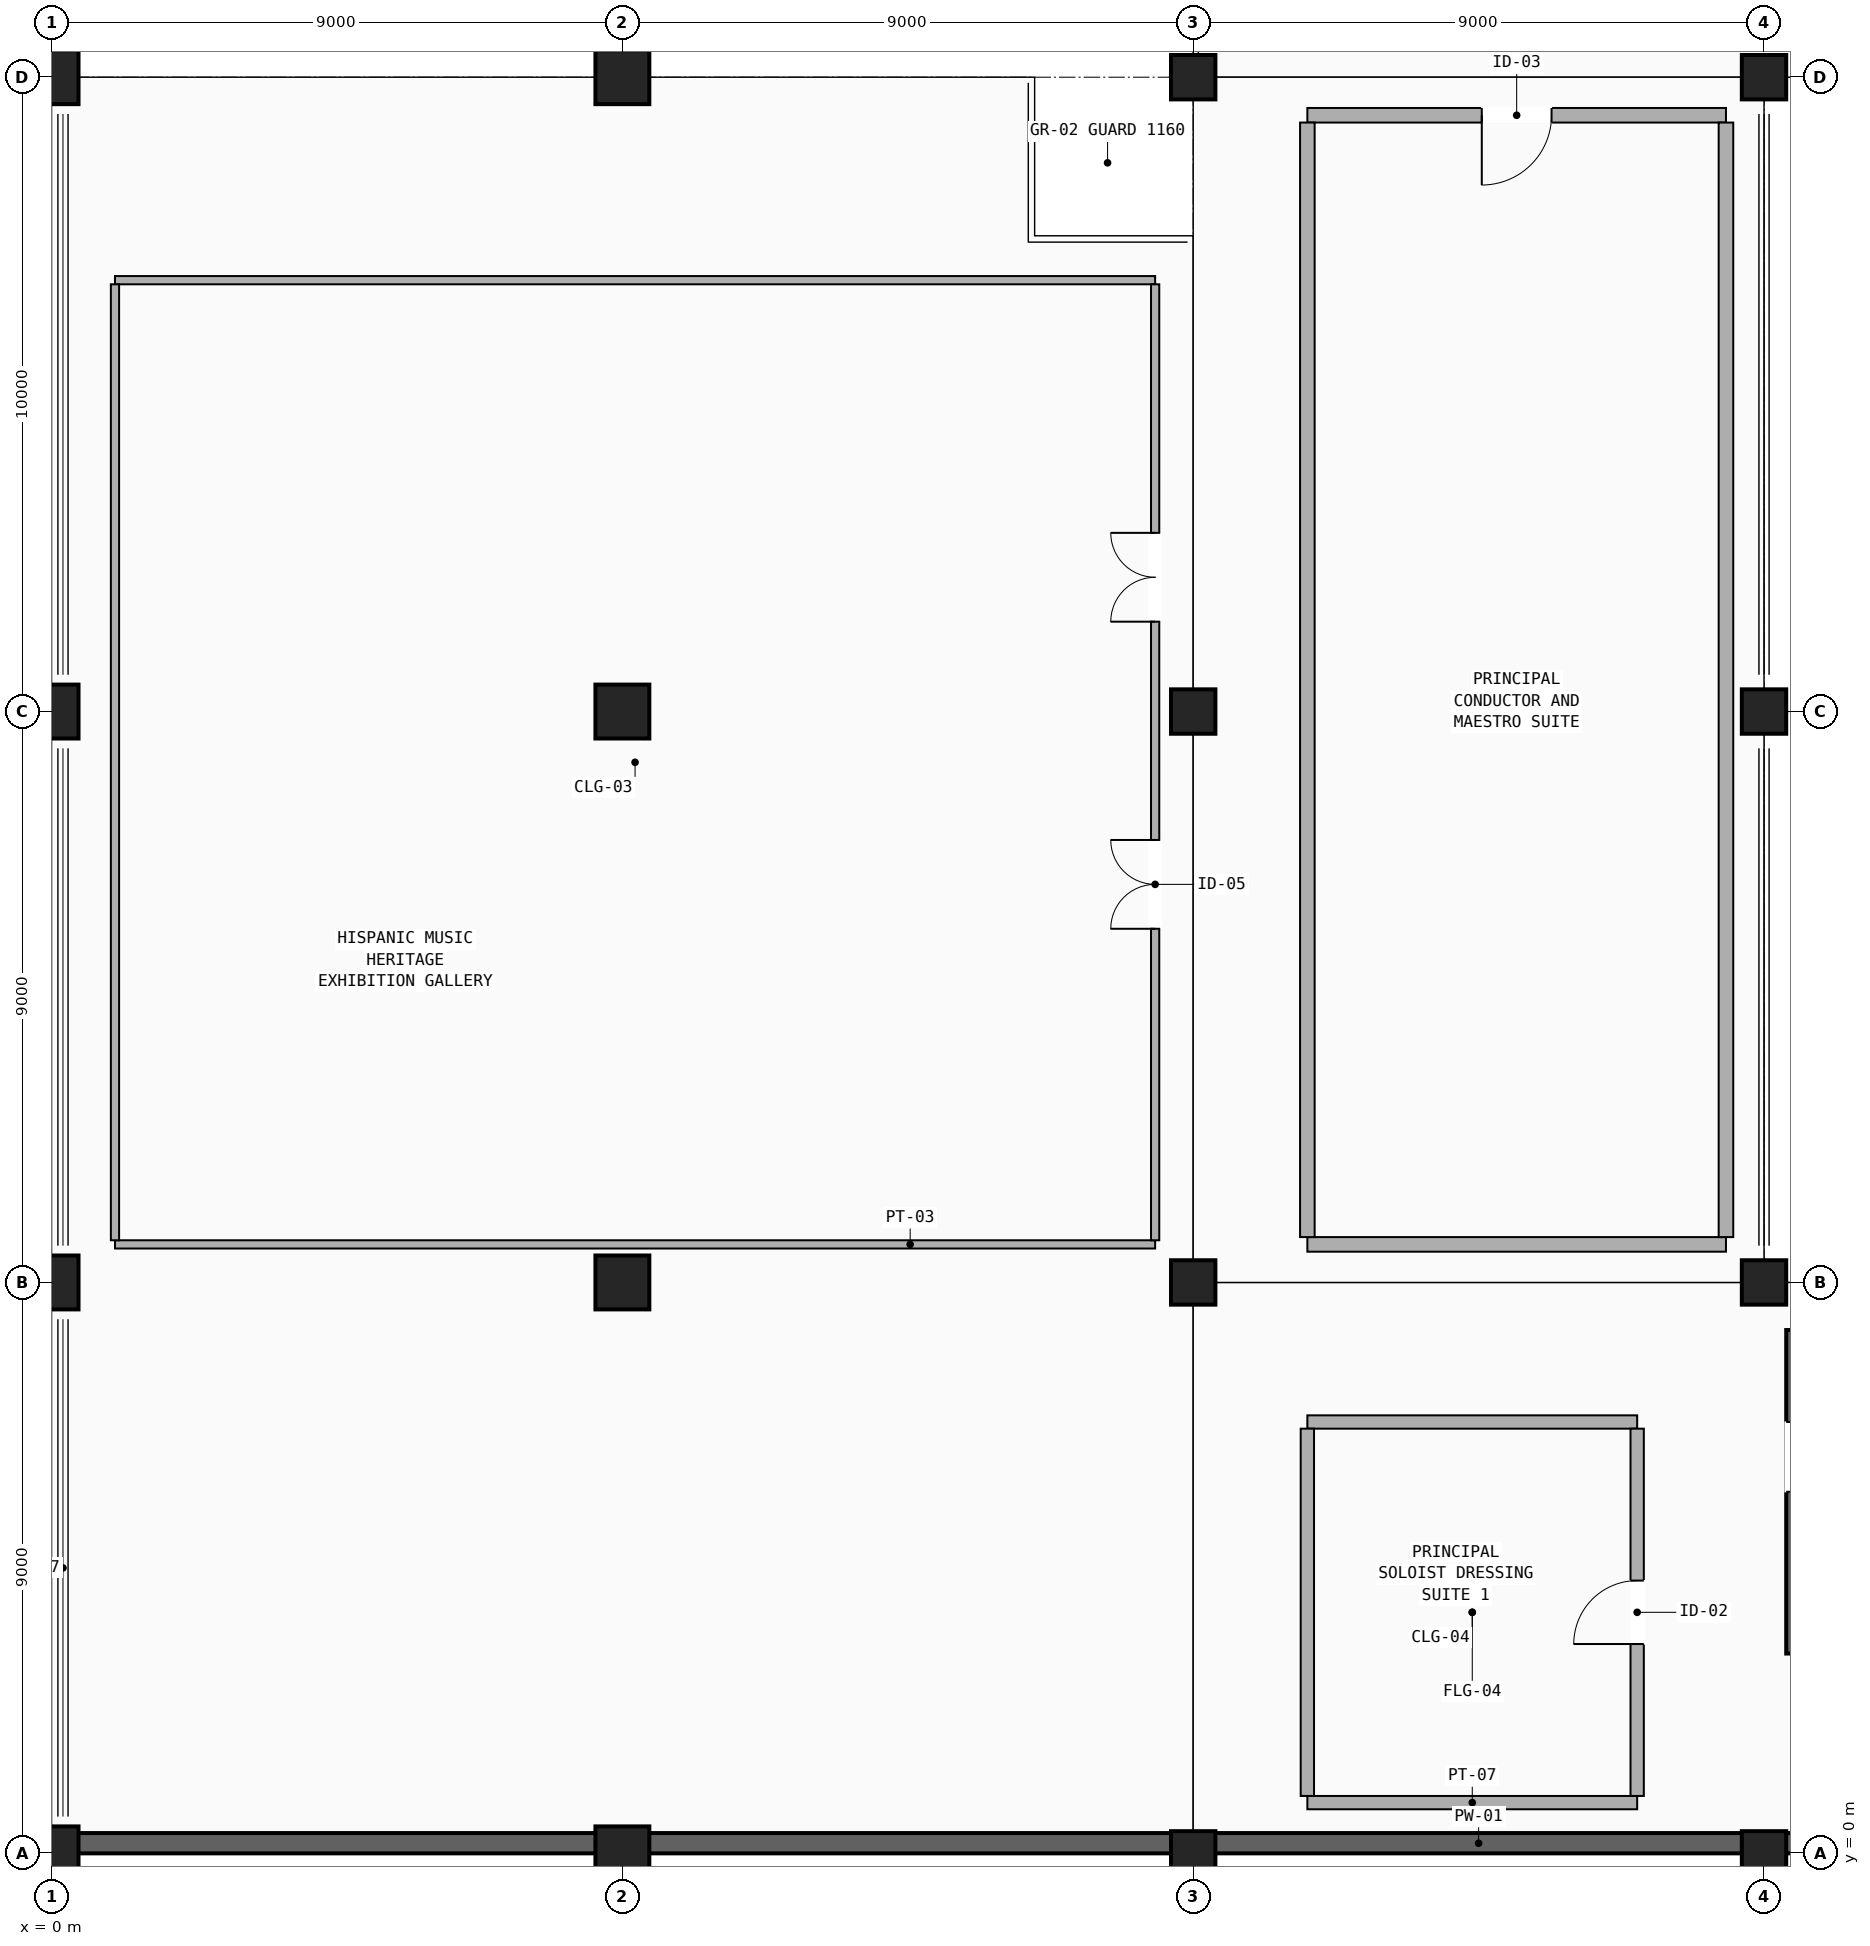
"""IFC4 building model, lengths in metres.
Left out: names, types, materials, properties, quantities, classifications, styles, units other than length and angle.
Written with IfcOpenShell. Run it as: python <this file> out.ifc"""

import sys

from ifc_helpers import new_model, si_unit, direction, frame, frame_2d, origin, origin_2d, place, context, subcontext, project, spatial, rectangle, circle, extrude, element, fill, save


model = new_model("IFC4")
c1 = context("Model", 3, precision=1e-05, world=origin(), true_north=direction((0.0, 1.0)))
c2 = subcontext(c1, "Body", "Model", "MODEL_VIEW")
j1 = project(units=[si_unit("LENGTHUNIT", "METRE"), si_unit("PLANEANGLEUNIT", "RADIAN")], contexts=[c1])
p1 = place(None, origin())
s1 = spatial("IfcSite", under=j1, at=p1, CompositionType="ELEMENT")
p2 = place(p1, origin())
s2 = spatial("IfcBuilding", under=s1, at=p2, CompositionType="ELEMENT")
p3 = place(p2, frame((0.0, 0.0, 5.1)))
s3 = spatial("IfcBuildingStorey", under=s2, at=p3, CompositionType="ELEMENT", Elevation=5.1)
for number, where, z_axis, x_axis in (
    (1, (0.0, 0.0, 0.0), (0.0, 0.0, 1.0), (1.0, 0.0, 0.0)),
    (2, (0.0, 9.0, 0.0), (0.0, 0.0, 1.0), (1.0, 0.0, 0.0)),
    (3, (0.0, 18.0, 0.0), (0.0, 0.0, 1.0), (1.0, 0.0, 0.0)),
    (4, (0.0, 28.0, 0.0), (0.0, 0.0, 1.0), (1.0, 0.0, 0.0)),
    (5, (9.0, 0.0, 0.0), (0.0, 0.0, 1.0), (1.0, 0.0, 0.0)),
    (6, (9.0, 9.0, 0.0), (0.0, 0.0, 1.0), (1.0, 0.0, 0.0)),
    (7, (9.0, 18.0, 0.0), (0.0, 0.0, 1.0), (1.0, 0.0, 0.0)),
    (8, (9.0, 28.0, 0.0), (0.0, 0.0, 1.0), (1.0, 0.0, 0.0)),
):
    element("IfcColumn", number, at=place(p3, frame(where, z_axis=z_axis, x_axis=x_axis)), inside=s3, PredefinedType="COLUMN", context=c2, shape_type="SweptSolid", body=[
        extrude(circle(Radius=0.425, at=origin_2d()), origin(), (0.0, 0.0, 1.0), 4.42),
    ])
for number, where, z_axis, x_axis in (
    (9, (18.0, 0.0, 0.0), (0.0, 0.0, 1.0), (1.0, 0.0, 0.0)),
    (10, (18.0, 9.0, 0.0), (0.0, 0.0, 1.0), (1.0, 0.0, 0.0)),
    (11, (18.0, 18.0, 0.0), (0.0, 0.0, 1.0), (1.0, 0.0, 0.0)),
    (12, (18.0, 28.0, 0.0), (0.0, 0.0, 1.0), (1.0, 0.0, 0.0)),
    (13, (27.0, 0.0, 0.0), (0.0, 0.0, 1.0), (1.0, 0.0, 0.0)),
    (14, (27.0, 9.0, 0.0), (0.0, 0.0, 1.0), (1.0, 0.0, 0.0)),
    (15, (27.0, 18.0, 0.0), (0.0, 0.0, 1.0), (1.0, 0.0, 0.0)),
    (16, (27.0, 28.0, 0.0), (0.0, 0.0, 1.0), (1.0, 0.0, 0.0)),
):
    element("IfcColumn", number, at=place(p3, frame(where, z_axis=z_axis, x_axis=x_axis)), inside=s3, PredefinedType="COLUMN", context=c2, shape_type="SweptSolid", body=[
        extrude(rectangle(XDim=0.7, YDim=0.7, at=origin_2d()), origin(), (0.0, 0.0, 1.0), 4.42),
    ])
p4 = place(p3, frame((27.5, 3.15, 0.0), z_axis=(0.0, 0.0, 1.0), x_axis=(0.0, 1.0, 0.0)))
e17 = element("IfcWall", 17, at=p4, inside=s3, PredefinedType="SHEAR", context=c2, shape_type="SweptSolid", body=[
    extrude(rectangle(XDim=5.1, YDim=0.3, at=frame_2d((2.55, 0.0))), origin(), (0.0, 0.0, 1.0), 4.42),
])
p5 = place(p4, frame((2.55, 0.0, 0.0)))
e18 = element("IfcOpeningElement", 18, at=p5, cuts=e17, PredefinedType="OPENING", context=c2, shape_type="SweptSolid", body=[
    extrude(rectangle(XDim=1.1, YDim=2.2, at=frame_2d((0.55, 1.1))), frame((0.0, 0.16, 0.0), z_axis=(0.0, -1.0, 0.0), x_axis=(1.0, 0.0, 0.0)), (0.0, 0.0, 1.0), 0.32),
])
p6 = place(p3, frame((0.35, 0.16, 0.0), z_axis=(0.0, 0.0, 1.0), x_axis=(1.0, 0.0, 0.0)))
e19 = element("IfcWall", 19, at=p6, inside=s3, PredefinedType="SHEAR", context=c2, shape_type="SweptSolid", body=[
    extrude(rectangle(XDim=62.95, YDim=0.32, at=frame_2d((31.475, 0.0))), origin(), (0.0, 0.0, 1.0), 4.42),
])
for number, where, z_axis, x_axis in (
    (20, (19.8, 0.8, 0.0), (0.0, 0.0, 1.0), (1.0, 0.0, 0.0)),
    (21, (19.8, 6.8, 0.0), (0.0, 0.0, 1.0), (1.0, 0.0, 0.0)),
):
    element("IfcWall", number, at=place(p3, frame(where, z_axis=z_axis, x_axis=x_axis)), inside=s3, PredefinedType="PARTITIONING", context=c2, shape_type="SweptSolid", body=[
        extrude(rectangle(XDim=5.2, YDim=0.21, at=frame_2d((2.6, 0.0))), origin(), (0.0, 0.0, 1.0), 4.16),
    ])
p7 = place(p3, frame((19.8, 0.905, 0.0), z_axis=(0.0, 0.0, 1.0), x_axis=(0.0, 1.0, 0.0)))
e22 = element("IfcWall", 22, at=p7, inside=s3, PredefinedType="PARTITIONING", context=c2, shape_type="SweptSolid", body=[
    extrude(rectangle(XDim=5.79, YDim=0.21, at=frame_2d((2.895, 0.0))), origin(), (0.0, 0.0, 1.0), 3.681),
])
p8 = place(p3, frame((25.0, 0.905, 0.0), z_axis=(0.0, 0.0, 1.0), x_axis=(0.0, 1.0, 0.0)))
e23 = element("IfcWall", 23, at=p8, inside=s3, PredefinedType="PARTITIONING", context=c2, shape_type="SweptSolid", body=[
    extrude(rectangle(XDim=5.79, YDim=0.21, at=frame_2d((2.895, 0.0))), origin(), (0.0, 0.0, 1.0), 3.681),
])
p9 = place(p8, frame((2.395, 0.0, 0.0)))
e24 = element("IfcOpeningElement", 24, at=p9, cuts=e23, PredefinedType="OPENING", context=c2, shape_type="SweptSolid", body=[
    extrude(rectangle(XDim=1.0, YDim=2.15, at=frame_2d((0.5, 1.075))), frame((0.0, 0.115, 0.0), z_axis=(0.0, -1.0, 0.0), x_axis=(1.0, 0.0, 0.0)), (0.0, 0.0, 1.0), 0.23),
])
for number, where, z_axis, x_axis in (
    (25, (1.0, 9.6, 0.0), (0.0, 0.0, 1.0), (1.0, 0.0, 0.0)),
    (26, (1.0, 24.8, 0.0), (0.0, 0.0, 1.0), (1.0, 0.0, 0.0)),
):
    element("IfcWall", number, at=place(p3, frame(where, z_axis=z_axis, x_axis=x_axis)), inside=s3, PredefinedType="PARTITIONING", context=c2, shape_type="SweptSolid", body=[
        extrude(rectangle(XDim=16.4, YDim=0.13, at=frame_2d((8.2, 0.0))), origin(), (0.0, 0.0, 1.0), 4.16),
    ])
p10 = place(p3, frame((1.0, 9.665, 0.0), z_axis=(0.0, 0.0, 1.0), x_axis=(0.0, 1.0, 0.0)))
e27 = element("IfcWall", 27, at=p10, inside=s3, PredefinedType="PARTITIONING", context=c2, shape_type="SweptSolid", body=[
    extrude(rectangle(XDim=15.07, YDim=0.13, at=frame_2d((7.535, 0.0))), origin(), (0.0, 0.0, 1.0), 3.617),
])
p11 = place(p3, frame((17.4, 9.665, 0.0), z_axis=(0.0, 0.0, 1.0), x_axis=(0.0, 1.0, 0.0)))
e28 = element("IfcWall", 28, at=p11, inside=s3, PredefinedType="PARTITIONING", context=c2, shape_type="SweptSolid", body=[
    extrude(rectangle(XDim=15.07, YDim=0.13, at=frame_2d((7.535, 0.0))), origin(), (0.0, 0.0, 1.0), 3.617),
])
p12 = place(p11, frame((4.91, 0.0, 0.0)))
e29 = element("IfcOpeningElement", 29, at=p12, cuts=e28, PredefinedType="OPENING", context=c2, shape_type="SweptSolid", body=[
    extrude(rectangle(XDim=1.4, YDim=2.2, at=frame_2d((0.7, 1.1))), frame((0.0, 0.075, 0.0), z_axis=(0.0, -1.0, 0.0), x_axis=(1.0, 0.0, 0.0)), (0.0, 0.0, 1.0), 0.15),
])
p13 = place(p11, frame((9.752, 0.0, 0.0)))
e30 = element("IfcOpeningElement", 30, at=p13, cuts=e28, PredefinedType="OPENING", context=c2, shape_type="SweptSolid", body=[
    extrude(rectangle(XDim=1.4, YDim=2.2, at=frame_2d((0.7, 1.1))), frame((0.0, 0.075, 0.0), z_axis=(0.0, -1.0, 0.0), x_axis=(1.0, 0.0, 0.0)), (0.0, 0.0, 1.0), 0.15),
])
p14 = place(p3, frame((19.8, 9.6, 0.0), z_axis=(0.0, 0.0, 1.0), x_axis=(1.0, 0.0, 0.0)))
e31 = element("IfcWall", 31, at=p14, inside=s3, PredefinedType="PARTITIONING", context=c2, shape_type="SweptSolid", body=[
    extrude(rectangle(XDim=6.6, YDim=0.23, at=frame_2d((3.3, 0.0))), origin(), (0.0, 0.0, 1.0), 4.16),
])
p15 = place(p3, frame((19.8, 27.4, 0.0), z_axis=(0.0, 0.0, 1.0), x_axis=(1.0, 0.0, 0.0)))
e32 = element("IfcWall", 32, at=p15, inside=s3, PredefinedType="PARTITIONING", context=c2, shape_type="SweptSolid", body=[
    extrude(rectangle(XDim=6.6, YDim=0.23, at=frame_2d((3.3, 0.0))), origin(), (0.0, 0.0, 1.0), 4.16),
])
p16 = place(p15, frame((2.75, 0.0, 0.0)))
e33 = element("IfcOpeningElement", 33, at=p16, cuts=e32, PredefinedType="OPENING", context=c2, shape_type="SweptSolid", body=[
    extrude(rectangle(XDim=1.1, YDim=2.2, at=frame_2d((0.55, 1.1))), frame((0.0, 0.125, 0.0), z_axis=(0.0, -1.0, 0.0), x_axis=(1.0, 0.0, 0.0)), (0.0, 0.0, 1.0), 0.25),
])
for number, where, z_axis, x_axis in (
    (34, (19.8, 9.715, 0.0), (0.0, 0.0, 1.0), (0.0, 1.0, 0.0)),
    (35, (26.4, 9.715, 0.0), (0.0, 0.0, 1.0), (0.0, 1.0, 0.0)),
):
    element("IfcWall", number, at=place(p3, frame(where, z_axis=z_axis, x_axis=x_axis)), inside=s3, PredefinedType="PARTITIONING", context=c2, shape_type="SweptSolid", body=[
        extrude(rectangle(XDim=17.57, YDim=0.23, at=frame_2d((8.785, 0.0))), origin(), (0.0, 0.0, 1.0), 3.14),
    ])
p17 = place(p9, origin())
e36 = element("IfcDoor", 36, at=p17, inside=s3, OperationType="SINGLE_SWING_LEFT", PredefinedType="DOOR", context=c2, shape_type="SweptSolid", body=[
    extrude(rectangle(XDim=1.0, YDim=2.15, at=frame_2d((0.5, 1.075))), frame((0.0, 0.025, 0.0), z_axis=(0.0, -1.0, 0.0), x_axis=(1.0, 0.0, 0.0)), (0.0, 0.0, 1.0), 0.05),
])
fill(e24, e36)
p18 = place(p12, origin())
e37 = element("IfcDoor", 37, at=p18, inside=s3, OperationType="DOUBLE_DOOR_SINGLE_SWING", PredefinedType="DOOR", context=c2, shape_type="SweptSolid", body=[
    extrude(rectangle(XDim=1.4, YDim=2.2, at=frame_2d((0.7, 1.1))), frame((0.0, 0.025, 0.0), z_axis=(0.0, -1.0, 0.0), x_axis=(1.0, 0.0, 0.0)), (0.0, 0.0, 1.0), 0.05),
])
fill(e29, e37)
p19 = place(p13, origin())
e38 = element("IfcDoor", 38, at=p19, inside=s3, OperationType="DOUBLE_DOOR_SINGLE_SWING", PredefinedType="DOOR", context=c2, shape_type="SweptSolid", body=[
    extrude(rectangle(XDim=1.4, YDim=2.2, at=frame_2d((0.7, 1.1))), frame((0.0, 0.025, 0.0), z_axis=(0.0, -1.0, 0.0), x_axis=(1.0, 0.0, 0.0)), (0.0, 0.0, 1.0), 0.05),
])
fill(e30, e38)
p20 = place(p16, frame((1.1, 0.0, 0.0), z_axis=(0.0, 0.0, 1.0), x_axis=(-1.0, 0.0, 0.0)))
e39 = element("IfcDoor", 39, at=p20, inside=s3, OperationType="SINGLE_SWING_RIGHT", PredefinedType="DOOR", context=c2, shape_type="SweptSolid", body=[
    extrude(rectangle(XDim=1.1, YDim=2.2, at=frame_2d((0.55, 1.1))), frame((0.0, 0.025, 0.0), z_axis=(0.0, -1.0, 0.0), x_axis=(1.0, 0.0, 0.0)), (0.0, 0.0, 1.0), 0.05),
])
fill(e33, e39)
save(model, sys.argv[1])
